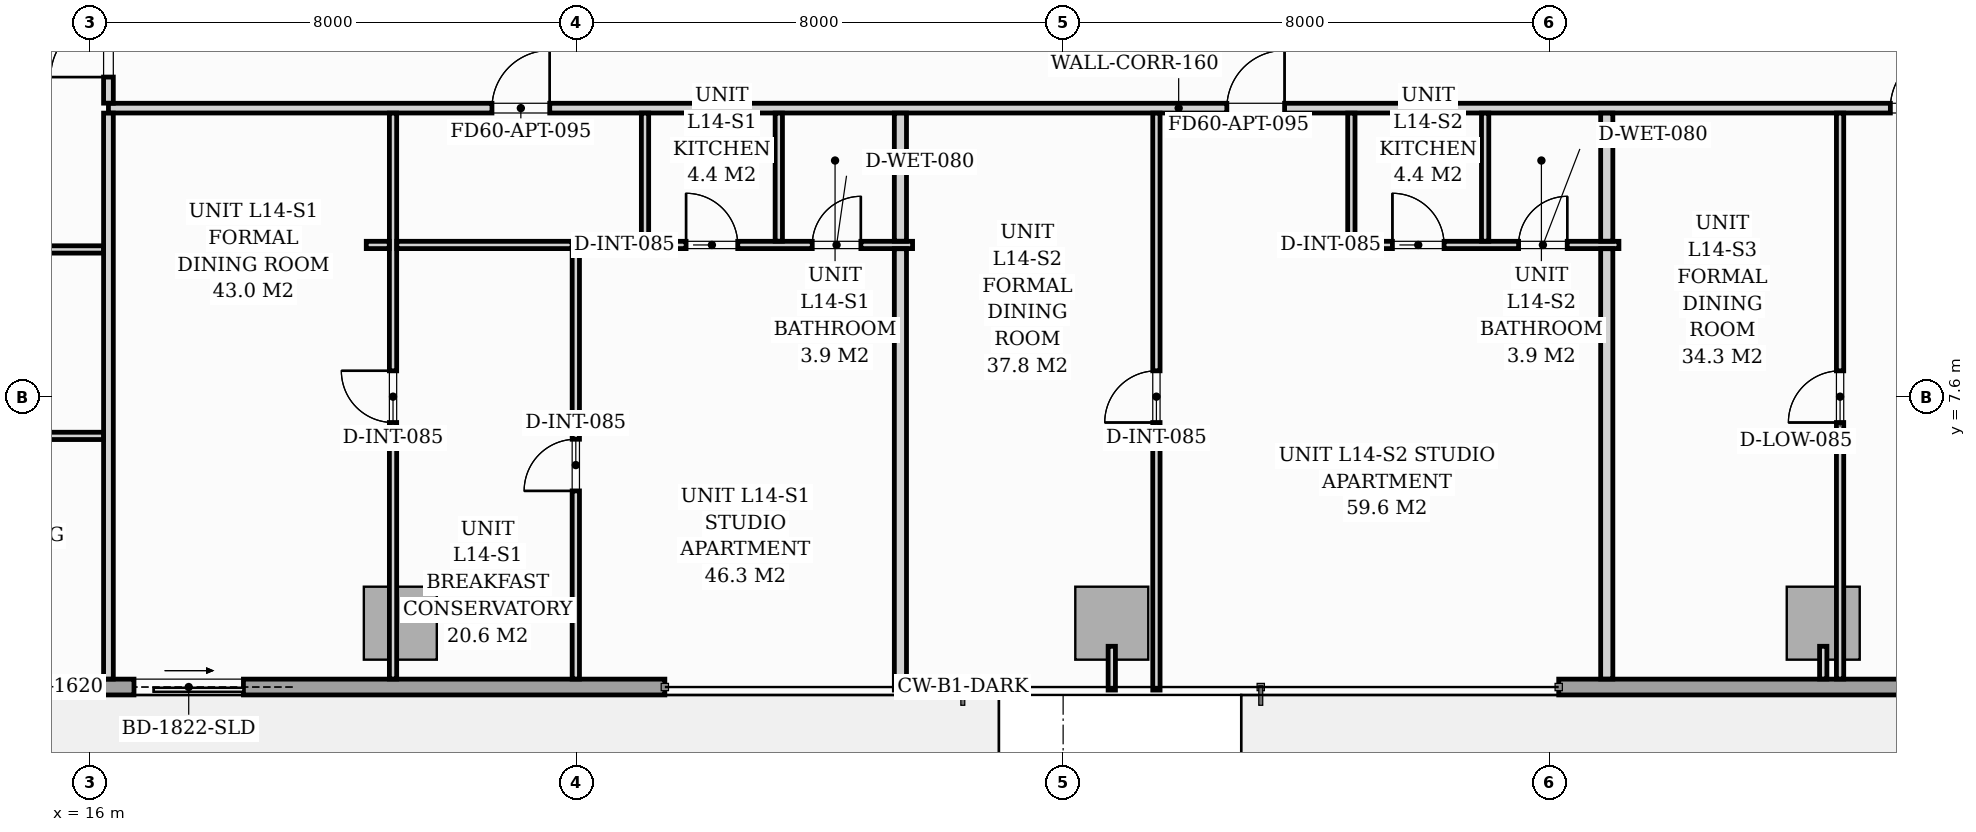
"""IFC4 building model, lengths in metres.
Left out: names, types, materials, properties, quantities, classifications, styles, units other than length and angle.
Written with IfcOpenShell. Run it as: python <this file> out.ifc"""

import sys

from ifc_helpers import new_model, si_unit, direction, frame, frame_2d, origin, origin_2d, place, context, subcontext, project, spatial, rectangle, extrude, source, transform, mapped, element, fill, save


model = new_model("IFC4")
c1 = context("Model", 3, precision=1e-05, world=origin(), true_north=direction((0.0, 1.0)))
c2 = subcontext(c1, "Body", "Model", "MODEL_VIEW")
j1 = project(units=[si_unit("LENGTHUNIT", "METRE"), si_unit("PLANEANGLEUNIT", "RADIAN")], contexts=[c1])
p1 = place(None, origin())
s1 = spatial("IfcSite", under=j1, at=p1, CompositionType="ELEMENT")
p2 = place(p1, origin())
s2 = spatial("IfcBuilding", under=s1, at=p2, CompositionType="ELEMENT")
p3 = place(p2, frame((0.0, 0.0, 51.8)))
s3 = spatial("IfcBuildingStorey", under=s2, at=p3, CompositionType="ELEMENT", Elevation=51.8)
m1 = source(origin(), c2, "Body", "SweptSolid", [
    extrude(rectangle(XDim=1.2, YDim=1.2, at=origin_2d()), origin(), (0.0, 0.0, 1.0), 3.196),
])
for number, where, z_axis, x_axis in (
    (1, (21.1, 3.88, 0.002), (0.0, 0.0, 1.0), (1.0, 0.0, 0.0)),
    (2, (32.8, 3.88, 0.002), (0.0, 0.0, 1.0), (1.0, 0.0, 0.0)),
    (3, (44.5, 3.88, 0.002), (0.0, 0.0, 1.0), (1.0, 0.0, 0.0)),
):
    element("IfcColumn", number, at=place(p3, frame(where, z_axis=z_axis, x_axis=x_axis)), inside=s3, PredefinedType="COLUMN", context=c2, shape_type="MappedRepresentation", body=[
        mapped(m1, transform((0.0, 0.0, 0.0), scale=1.0)),
    ])
p4 = place(p3, frame((57.3, 2.83, 0.0), z_axis=(0.0, 0.0, 1.0), x_axis=(-1.0, 0.0, 0.0)))
e4 = element("IfcWall", 4, at=p4, inside=s3, PredefinedType="STANDARD", context=c2, shape_type="SweptSolid", body=[
    extrude(rectangle(XDim=17.15, YDim=0.26, at=frame_2d((8.575, 0.0))), origin(), (0.0, 0.0, 1.0), 2.94),
])
p5 = place(p4, frame((8.034, 0.0, 0.0)))
e5 = element("IfcOpeningElement", 5, at=p5, cuts=e4, PredefinedType="OPENING", context=c2, shape_type="SweptSolid", body=[
    extrude(rectangle(XDim=1.8, YDim=2.06, at=frame_2d((0.9, 1.03))), frame((0.0, 0.14, 0.0), z_axis=(0.0, -1.0, 0.0), x_axis=(1.0, 0.0, 0.0)), (0.0, 0.0, 1.0), 0.28),
])
p6 = place(p4, frame((2.05, 0.0, 0.65)))
e6 = element("IfcOpeningElement", 6, at=p6, cuts=e4, PredefinedType="OPENING", context=c2, shape_type="SweptSolid", body=[
    extrude(rectangle(XDim=1.6, YDim=1.5, at=frame_2d((0.8, 0.75))), frame((0.0, 0.14, 0.0), z_axis=(0.0, -1.0, 0.0), x_axis=(1.0, 0.0, 0.0)), (0.0, 0.0, 1.0), 0.28),
])
p7 = place(p3, frame((25.45, 2.83, 0.0), z_axis=(0.0, 0.0, 1.0), x_axis=(-1.0, 0.0, 0.0)))
e7 = element("IfcWall", 7, at=p7, inside=s3, PredefinedType="STANDARD", context=c2, shape_type="SweptSolid", body=[
    extrude(rectangle(XDim=17.15, YDim=0.26, at=frame_2d((8.575, 0.0))), origin(), (0.0, 0.0, 1.0), 2.94),
])
p8 = place(p7, frame((6.93, 0.0, 0.0)))
e8 = element("IfcOpeningElement", 8, at=p8, cuts=e7, PredefinedType="OPENING", context=c2, shape_type="SweptSolid", body=[
    extrude(rectangle(XDim=1.8, YDim=2.06, at=frame_2d((0.9, 1.03))), frame((0.0, 0.14, 0.0), z_axis=(0.0, -1.0, 0.0), x_axis=(1.0, 0.0, 0.0)), (0.0, 0.0, 1.0), 0.28),
])
p9 = place(p7, frame((9.7, 0.0, 0.65)))
e9 = element("IfcOpeningElement", 9, at=p9, cuts=e7, PredefinedType="OPENING", context=c2, shape_type="SweptSolid", body=[
    extrude(rectangle(XDim=1.6, YDim=1.5, at=frame_2d((0.8, 0.75))), frame((0.0, 0.14, 0.0), z_axis=(0.0, -1.0, 0.0), x_axis=(1.0, 0.0, 0.0)), (0.0, 0.0, 1.0), 0.28),
])
p10 = place(p3, frame((16.3, 12.35, 0.0), z_axis=(0.0, 0.0, 1.0), x_axis=(1.0, 0.0, 0.0)))
e10 = element("IfcWall", 10, at=p10, inside=s3, PredefinedType="PARTITIONING", context=c2, shape_type="SweptSolid", body=[
    extrude(rectangle(XDim=35.2, YDim=0.16, at=frame_2d((17.6, 0.0))), origin(), (0.0, 0.0, 1.0), 2.94),
])
p11 = place(p10, frame((6.307, 0.0, 0.0)))
e11 = element("IfcOpeningElement", 11, at=p11, cuts=e10, PredefinedType="OPENING", context=c2, shape_type="SweptSolid", body=[
    extrude(rectangle(XDim=0.95, YDim=2.06, at=frame_2d((0.475, 1.03))), frame((0.0, 0.09, 0.0), z_axis=(0.0, -1.0, 0.0), x_axis=(1.0, 0.0, 0.0)), (0.0, 0.0, 1.0), 0.18),
])
p12 = place(p10, frame((18.392, 0.0, 0.0)))
e12 = element("IfcOpeningElement", 12, at=p12, cuts=e10, PredefinedType="OPENING", context=c2, shape_type="SweptSolid", body=[
    extrude(rectangle(XDim=0.95, YDim=2.06, at=frame_2d((0.475, 1.03))), frame((0.0, 0.09, 0.0), z_axis=(0.0, -1.0, 0.0), x_axis=(1.0, 0.0, 0.0)), (0.0, 0.0, 1.0), 0.18),
])
p13 = place(p10, frame((29.304, 0.0, 0.0)))
e13 = element("IfcOpeningElement", 13, at=p13, cuts=e10, PredefinedType="OPENING", context=c2, shape_type="SweptSolid", body=[
    extrude(rectangle(XDim=0.95, YDim=2.06, at=frame_2d((0.475, 1.03))), frame((0.0, 0.09, 0.0), z_axis=(0.0, -1.0, 0.0), x_axis=(1.0, 0.0, 0.0)), (0.0, 0.0, 1.0), 0.18),
])
p14 = place(p3, frame((16.3, 2.962, 0.0), z_axis=(0.0, 0.0, 1.0), x_axis=(0.0, 1.0, 0.0)))
e14 = element("IfcWall", 14, at=p14, inside=s3, PredefinedType="PARTITIONING", context=c2, shape_type="SweptSolid", body=[
    extrude(rectangle(XDim=9.306, YDim=0.16, at=frame_2d((4.653, 0.0))), origin(), (0.0, 0.0, 1.0), 2.94),
])
p15 = place(p3, frame((16.3, 12.432, 0.0), z_axis=(0.0, 0.0, 1.0), x_axis=(0.0, 1.0, 0.0)))
e15 = element("IfcWall", 15, at=p15, inside=s3, PredefinedType="PARTITIONING", context=c2, shape_type="SweptSolid", body=[
    extrude(rectangle(XDim=15.006, YDim=0.16, at=frame_2d((7.503, 0.0))), origin(), (0.0, 0.0, 1.0), 2.94),
])
p16 = place(p15, frame((0.429, 0.0, 0.0)))
e16 = element("IfcOpeningElement", 16, at=p16, cuts=e15, PredefinedType="OPENING", context=c2, shape_type="SweptSolid", body=[
    extrude(rectangle(XDim=0.95, YDim=2.06, at=frame_2d((0.475, 1.03))), frame((0.0, 0.09, 0.0), z_axis=(0.0, -1.0, 0.0), x_axis=(1.0, 0.0, 0.0)), (0.0, 0.0, 1.0), 0.18),
])
p17 = place(p3, frame((25.124, 10.1, 0.0), z_axis=(0.0, 0.0, 1.0), x_axis=(1.0, 0.0, 0.0)))
e17 = element("IfcWall", 17, at=p17, inside=s3, PredefinedType="PARTITIONING", context=c2, shape_type="SweptSolid", body=[
    extrude(rectangle(XDim=4.4, YDim=0.12, at=frame_2d((2.2, 0.0))), origin(), (0.0, 0.0, 1.0), 2.94),
])
p18 = place(p17, frame((0.675, 0.0, 0.0)))
e18 = element("IfcOpeningElement", 18, at=p18, cuts=e17, PredefinedType="OPENING", context=c2, shape_type="SweptSolid", body=[
    extrude(rectangle(XDim=0.85, YDim=2.05, at=frame_2d((0.425, 1.025))), frame((0.0, 0.07, 0.0), z_axis=(0.0, -1.0, 0.0), x_axis=(1.0, 0.0, 0.0)), (0.0, 0.0, 1.0), 0.14),
])
p19 = place(p17, frame((2.75, 0.0, 0.0)))
e19 = element("IfcOpeningElement", 19, at=p19, cuts=e17, PredefinedType="OPENING", context=c2, shape_type="SweptSolid", body=[
    extrude(rectangle(XDim=0.8, YDim=2.02, at=frame_2d((0.4, 1.01))), frame((0.0, 0.07, 0.0), z_axis=(0.0, -1.0, 0.0), x_axis=(1.0, 0.0, 0.0)), (0.0, 0.0, 1.0), 0.14),
])
for number, where, z_axis, x_axis in (
    (20, (25.124, 10.162, 0.0), (0.0, 0.0, 1.0), (0.0, 1.0, 0.0)),
    (21, (27.324, 10.162, 0.0), (0.0, 0.0, 1.0), (0.0, 1.0, 0.0)),
):
    element("IfcWall", number, at=place(p3, frame(where, z_axis=z_axis, x_axis=x_axis)), inside=s3, PredefinedType="PARTITIONING", context=c2, shape_type="SweptSolid", body=[
        extrude(rectangle(XDim=2.106, YDim=0.12, at=frame_2d((1.053, 0.0))), origin(), (0.0, 0.0, 1.0), 2.94),
    ])
p20 = place(p3, frame((20.98, 2.962, 0.0), z_axis=(0.0, 0.0, 1.0), x_axis=(0.0, 1.0, 0.0)))
e22 = element("IfcWall", 22, at=p20, inside=s3, PredefinedType="PARTITIONING", context=c2, shape_type="SweptSolid", body=[
    extrude(rectangle(XDim=9.306, YDim=0.12, at=frame_2d((4.653, 0.0))), origin(), (0.0, 0.0, 1.0), 2.94),
])
p21 = place(p20, frame((4.218, 0.0, 0.0)))
e23 = element("IfcOpeningElement", 23, at=p21, cuts=e22, PredefinedType="OPENING", context=c2, shape_type="SweptSolid", body=[
    extrude(rectangle(XDim=0.85, YDim=2.05, at=frame_2d((0.425, 1.025))), frame((0.0, 0.07, 0.0), z_axis=(0.0, -1.0, 0.0), x_axis=(1.0, 0.0, 0.0)), (0.0, 0.0, 1.0), 0.14),
])
p22 = place(p3, frame((23.986, 2.962, 0.0), z_axis=(0.0, 0.0, 1.0), x_axis=(0.0, 1.0, 0.0)))
e24 = element("IfcWall", 24, at=p22, inside=s3, PredefinedType="PARTITIONING", context=c2, shape_type="SweptSolid", body=[
    extrude(rectangle(XDim=7.138, YDim=0.12, at=frame_2d((3.569, 0.0))), origin(), (0.0, 0.0, 1.0), 2.94),
])
p23 = place(p22, frame((3.093, 0.0, 0.0)))
e25 = element("IfcOpeningElement", 25, at=p23, cuts=e24, PredefinedType="OPENING", context=c2, shape_type="SweptSolid", body=[
    extrude(rectangle(XDim=0.85, YDim=2.05, at=frame_2d((0.425, 1.025))), frame((0.0, 0.07, 0.0), z_axis=(0.0, -1.0, 0.0), x_axis=(1.0, 0.0, 0.0)), (0.0, 0.0, 1.0), 0.14),
])
p24 = place(p3, frame((20.54, 10.1, 0.0), z_axis=(0.0, 0.0, 1.0), x_axis=(1.0, 0.0, 0.0)))
e26 = element("IfcWall", 26, at=p24, inside=s3, PredefinedType="PARTITIONING", context=c2, shape_type="SweptSolid", body=[
    extrude(rectangle(XDim=0.378, YDim=0.12, at=frame_2d((0.189, 0.0))), origin(), (0.0, 0.0, 1.0), 2.94),
])
p25 = place(p3, frame((21.042, 10.1, 0.0), z_axis=(0.0, 0.0, 1.0), x_axis=(1.0, 0.0, 0.0)))
e27 = element("IfcWall", 27, at=p25, inside=s3, PredefinedType="PARTITIONING", context=c2, shape_type="SweptSolid", body=[
    extrude(rectangle(XDim=2.882, YDim=0.12, at=frame_2d((1.441, 0.0))), origin(), (0.0, 0.0, 1.0), 2.94),
])
p26 = place(p3, frame((29.324, 2.78, 0.0), z_axis=(0.0, 0.0, 1.0), x_axis=(0.0, 1.0, 0.0)))
e28 = element("IfcWall", 28, at=p26, inside=s3, PredefinedType="PARTITIONING", context=c2, shape_type="SweptSolid", body=[
    extrude(rectangle(XDim=7.258, YDim=0.2, at=frame_2d((3.629, 0.0))), origin(), (0.0, 0.0, 1.0), 2.94),
])
p27 = place(p3, frame((29.324, 10.162, 0.0), z_axis=(0.0, 0.0, 1.0), x_axis=(0.0, 1.0, 0.0)))
e29 = element("IfcWall", 29, at=p27, inside=s3, PredefinedType="PARTITIONING", context=c2, shape_type="SweptSolid", body=[
    extrude(rectangle(XDim=2.106, YDim=0.2, at=frame_2d((1.053, 0.0))), origin(), (0.0, 0.0, 1.0), 2.94),
])
p28 = place(p3, frame((36.74, 10.1, 0.0), z_axis=(0.0, 0.0, 1.0), x_axis=(1.0, 0.0, 0.0)))
e30 = element("IfcWall", 30, at=p28, inside=s3, PredefinedType="PARTITIONING", context=c2, shape_type="SweptSolid", body=[
    extrude(rectangle(XDim=4.4, YDim=0.12, at=frame_2d((2.2, 0.0))), origin(), (0.0, 0.0, 1.0), 2.94),
])
p29 = place(p28, frame((0.675, 0.0, 0.0)))
e31 = element("IfcOpeningElement", 31, at=p29, cuts=e30, PredefinedType="OPENING", context=c2, shape_type="SweptSolid", body=[
    extrude(rectangle(XDim=0.85, YDim=2.05, at=frame_2d((0.425, 1.025))), frame((0.0, 0.07, 0.0), z_axis=(0.0, -1.0, 0.0), x_axis=(1.0, 0.0, 0.0)), (0.0, 0.0, 1.0), 0.14),
])
p30 = place(p28, frame((2.75, 0.0, 0.0)))
e32 = element("IfcOpeningElement", 32, at=p30, cuts=e30, PredefinedType="OPENING", context=c2, shape_type="SweptSolid", body=[
    extrude(rectangle(XDim=0.8, YDim=2.02, at=frame_2d((0.4, 1.01))), frame((0.0, 0.07, 0.0), z_axis=(0.0, -1.0, 0.0), x_axis=(1.0, 0.0, 0.0)), (0.0, 0.0, 1.0), 0.14),
])
for number, where, z_axis, x_axis in (
    (33, (36.74, 10.162, 0.0), (0.0, 0.0, 1.0), (0.0, 1.0, 0.0)),
    (34, (38.94, 10.162, 0.0), (0.0, 0.0, 1.0), (0.0, 1.0, 0.0)),
):
    element("IfcWall", number, at=place(p3, frame(where, z_axis=z_axis, x_axis=x_axis)), inside=s3, PredefinedType="PARTITIONING", context=c2, shape_type="SweptSolid", body=[
        extrude(rectangle(XDim=2.106, YDim=0.12, at=frame_2d((1.053, 0.0))), origin(), (0.0, 0.0, 1.0), 2.94),
    ])
p31 = place(p3, frame((33.534, 2.78, 0.0), z_axis=(0.0, 0.0, 1.0), x_axis=(0.0, 1.0, 0.0)))
e35 = element("IfcWall", 35, at=p31, inside=s3, PredefinedType="PARTITIONING", context=c2, shape_type="SweptSolid", body=[
    extrude(rectangle(XDim=9.488, YDim=0.12, at=frame_2d((4.744, 0.0))), origin(), (0.0, 0.0, 1.0), 2.94),
])
p32 = place(p31, frame((4.4, 0.0, 0.0)))
e36 = element("IfcOpeningElement", 36, at=p32, cuts=e35, PredefinedType="OPENING", context=c2, shape_type="SweptSolid", body=[
    extrude(rectangle(XDim=0.85, YDim=2.05, at=frame_2d((0.425, 1.025))), frame((0.0, 0.07, 0.0), z_axis=(0.0, -1.0, 0.0), x_axis=(1.0, 0.0, 0.0)), (0.0, 0.0, 1.0), 0.14),
])
p33 = place(p3, frame((40.94, 2.962, 0.0), z_axis=(0.0, 0.0, 1.0), x_axis=(0.0, 1.0, 0.0)))
e37 = element("IfcWall", 37, at=p33, inside=s3, PredefinedType="PARTITIONING", context=c2, shape_type="SweptSolid", body=[
    extrude(rectangle(XDim=7.076, YDim=0.2, at=frame_2d((3.538, 0.0))), origin(), (0.0, 0.0, 1.0), 2.94),
])
p34 = place(p3, frame((40.94, 10.162, 0.0), z_axis=(0.0, 0.0, 1.0), x_axis=(0.0, 1.0, 0.0)))
e38 = element("IfcWall", 38, at=p34, inside=s3, PredefinedType="PARTITIONING", context=c2, shape_type="SweptSolid", body=[
    extrude(rectangle(XDim=2.106, YDim=0.2, at=frame_2d((1.053, 0.0))), origin(), (0.0, 0.0, 1.0), 2.94),
])
p35 = place(p3, frame((44.777, 2.962, 0.0), z_axis=(0.0, 0.0, 1.0), x_axis=(0.0, 1.0, 0.0)))
e39 = element("IfcWall", 39, at=p35, inside=s3, PredefinedType="PARTITIONING", context=c2, shape_type="SweptSolid", body=[
    extrude(rectangle(XDim=9.306, YDim=0.12, at=frame_2d((4.653, 0.0))), origin(), (0.0, 0.0, 1.0), 2.136),
])
p36 = place(p35, frame((4.218, 0.0, 0.0)))
e40 = element("IfcOpeningElement", 40, at=p36, cuts=e39, PredefinedType="OPENING", context=c2, shape_type="SweptSolid", body=[
    extrude(rectangle(XDim=0.85, YDim=2.01, at=frame_2d((0.425, 1.005))), frame((0.0, 0.07, 0.0), z_axis=(0.0, -1.0, 0.0), x_axis=(1.0, 0.0, 0.0)), (0.0, 0.0, 1.0), 0.14),
])
p37 = place(p3, frame((5.88, 6.96, 0.0), z_axis=(0.0, 0.0, 1.0), x_axis=(1.0, 0.0, 0.0)))
e41 = element("IfcWall", 41, at=p37, inside=s3, PredefinedType="PARTITIONING", context=c2, shape_type="SweptSolid", body=[
    extrude(rectangle(XDim=10.338, YDim=0.12, at=frame_2d((5.169, 0.0))), origin(), (0.0, 0.0, 1.0), 2.94),
])
p38 = place(p37, frame((4.735, 0.0, 0.0)))
e42 = element("IfcOpeningElement", 42, at=p38, cuts=e41, PredefinedType="OPENING", context=c2, shape_type="SweptSolid", body=[
    extrude(rectangle(XDim=0.85, YDim=2.05, at=frame_2d((0.425, 1.025))), frame((0.0, 0.07, 0.0), z_axis=(0.0, -1.0, 0.0), x_axis=(1.0, 0.0, 0.0)), (0.0, 0.0, 1.0), 0.14),
])
p39 = place(p3, frame((5.88, 10.026, 0.0), z_axis=(0.0, 0.0, 1.0), x_axis=(1.0, 0.0, 0.0)))
e43 = element("IfcWall", 43, at=p39, inside=s3, PredefinedType="PARTITIONING", context=c2, shape_type="SweptSolid", body=[
    extrude(rectangle(XDim=10.338, YDim=0.12, at=frame_2d((5.169, 0.0))), origin(), (0.0, 0.0, 1.0), 2.94),
])
p40 = place(p39, frame((4.735, 0.0, 0.0)))
e44 = element("IfcOpeningElement", 44, at=p40, cuts=e43, PredefinedType="OPENING", context=c2, shape_type="SweptSolid", body=[
    extrude(rectangle(XDim=0.85, YDim=2.05, at=frame_2d((0.425, 1.025))), frame((0.0, 0.07, 0.0), z_axis=(0.0, -1.0, 0.0), x_axis=(1.0, 0.0, 0.0)), (0.0, 0.0, 1.0), 0.14),
])
p41 = place(p3, frame((32.8, 3.5, 0.0), z_axis=(0.0, 0.0, 1.0), x_axis=(0.0, -1.0, 0.0)))
e45 = element("IfcWall", 45, at=p41, inside=s3, PredefinedType="PARTITIONING", context=c2, shape_type="SweptSolid", body=[
    extrude(rectangle(XDim=0.72, YDim=0.12, at=frame_2d((0.36, 0.0))), origin(), (0.0, 0.0, 1.0), 2.94),
])
p42 = place(p3, frame((44.5, 3.5, 0.0), z_axis=(0.0, 0.0, 1.0), x_axis=(0.0, -1.0, 0.0)))
e46 = element("IfcWall", 46, at=p42, inside=s3, PredefinedType="PARTITIONING", context=c2, shape_type="SweptSolid", body=[
    extrude(rectangle(XDim=0.538, YDim=0.12, at=frame_2d((0.269, 0.0))), origin(), (0.0, 0.0, 1.0), 2.94),
])
m2 = source(origin(), c2, "Body", "SweptSolid", [
    extrude(rectangle(XDim=1.8, YDim=2.06, at=frame_2d((0.9, 1.03))), frame((0.0, 0.025, 0.0), z_axis=(0.0, -1.0, 0.0), x_axis=(1.0, 0.0, 0.0)), (0.0, 0.0, 1.0), 0.05),
])
p43 = place(p8, origin())
e47 = element("IfcDoor", 47, at=p43, inside=s3, OperationType="SLIDING_TO_LEFT", PredefinedType="DOOR", context=c2, shape_type="MappedRepresentation", body=[
    mapped(m2, transform((0.0, 0.0, 0.0), scale=1.0)),
])
fill(e8, e47)
m3 = source(origin(), c2, "Body", "SweptSolid", [
    extrude(rectangle(XDim=1.6, YDim=1.5, at=frame_2d((0.8, 0.75))), frame((0.0, 0.03, 0.0), z_axis=(0.0, -1.0, 0.0), x_axis=(1.0, 0.0, 0.0)), (0.0, 0.0, 1.0), 0.06),
])
p44 = place(p9, origin())
e48 = element("IfcWindow", 48, at=p44, inside=s3, PartitioningType="SINGLE_PANEL", PredefinedType="WINDOW", context=c2, shape_type="MappedRepresentation", body=[
    mapped(m3, transform((0.0, 0.0, 0.0), scale=1.0)),
])
fill(e9, e48)
m4 = source(origin(), c2, "Body", "SweptSolid", [
    extrude(rectangle(XDim=0.85, YDim=2.05, at=frame_2d((0.425, 1.025))), frame((0.0, 0.025, 0.0), z_axis=(0.0, -1.0, 0.0), x_axis=(1.0, 0.0, 0.0)), (0.0, 0.0, 1.0), 0.05),
])
p45 = place(p21, origin())
e49 = element("IfcDoor", 49, at=p45, inside=s3, OperationType="SINGLE_SWING_RIGHT", PredefinedType="DOOR", context=c2, shape_type="MappedRepresentation", body=[
    mapped(m4, transform((0.0, 0.0, 0.0), scale=1.0)),
])
fill(e23, e49)
p46 = place(p23, origin())
e50 = element("IfcDoor", 50, at=p46, inside=s3, OperationType="SINGLE_SWING_LEFT", PredefinedType="DOOR", context=c2, shape_type="MappedRepresentation", body=[
    mapped(m4, transform((0.0, 0.0, 0.0), scale=1.0)),
])
fill(e25, e50)
m5 = source(origin(), c2, "Body", "SweptSolid", [
    extrude(rectangle(XDim=0.95, YDim=2.06, at=frame_2d((0.475, 1.03))), frame((0.0, 0.025, 0.0), z_axis=(0.0, -1.0, 0.0), x_axis=(1.0, 0.0, 0.0)), (0.0, 0.0, 1.0), 0.05),
])
p47 = place(p11, origin())
e51 = element("IfcDoor", 51, at=p47, inside=s3, OperationType="SINGLE_SWING_RIGHT", PredefinedType="DOOR", context=c2, shape_type="MappedRepresentation", body=[
    mapped(m5, transform((0.0, 0.0, 0.0), scale=1.0)),
])
fill(e11, e51)
p48 = place(p18, origin())
e52 = element("IfcDoor", 52, at=p48, inside=s3, OperationType="SINGLE_SWING_LEFT", PredefinedType="DOOR", context=c2, shape_type="MappedRepresentation", body=[
    mapped(m4, transform((0.0, 0.0, 0.0), scale=1.0)),
])
fill(e18, e52)
m6 = source(origin(), c2, "Body", "SweptSolid", [
    extrude(rectangle(XDim=0.8, YDim=2.02, at=frame_2d((0.4, 1.01))), frame((0.0, 0.025, 0.0), z_axis=(0.0, -1.0, 0.0), x_axis=(1.0, 0.0, 0.0)), (0.0, 0.0, 1.0), 0.05),
])
p49 = place(p19, origin())
e53 = element("IfcDoor", 53, at=p49, inside=s3, OperationType="SINGLE_SWING_RIGHT", PredefinedType="DOOR", context=c2, shape_type="MappedRepresentation", body=[
    mapped(m6, transform((0.0, 0.0, 0.0), scale=1.0)),
])
fill(e19, e53)
p50 = place(p32, origin())
e54 = element("IfcDoor", 54, at=p50, inside=s3, OperationType="SINGLE_SWING_LEFT", PredefinedType="DOOR", context=c2, shape_type="MappedRepresentation", body=[
    mapped(m4, transform((0.0, 0.0, 0.0), scale=1.0)),
])
fill(e36, e54)
p51 = place(p12, origin())
e55 = element("IfcDoor", 55, at=p51, inside=s3, OperationType="SINGLE_SWING_RIGHT", PredefinedType="DOOR", context=c2, shape_type="MappedRepresentation", body=[
    mapped(m5, transform((0.0, 0.0, 0.0), scale=1.0)),
])
fill(e12, e55)
p52 = place(p29, origin())
e56 = element("IfcDoor", 56, at=p52, inside=s3, OperationType="SINGLE_SWING_LEFT", PredefinedType="DOOR", context=c2, shape_type="MappedRepresentation", body=[
    mapped(m4, transform((0.0, 0.0, 0.0), scale=1.0)),
])
fill(e31, e56)
p53 = place(p30, origin())
e57 = element("IfcDoor", 57, at=p53, inside=s3, OperationType="SINGLE_SWING_RIGHT", PredefinedType="DOOR", context=c2, shape_type="MappedRepresentation", body=[
    mapped(m6, transform((0.0, 0.0, 0.0), scale=1.0)),
])
fill(e32, e57)
m7 = source(origin(), c2, "Body", "SweptSolid", [
    extrude(rectangle(XDim=0.85, YDim=2.01, at=frame_2d((0.425, 1.005))), frame((0.0, 0.025, 0.0), z_axis=(0.0, -1.0, 0.0), x_axis=(1.0, 0.0, 0.0)), (0.0, 0.0, 1.0), 0.05),
])
p54 = place(p36, origin())
e58 = element("IfcDoor", 58, at=p54, inside=s3, OperationType="SINGLE_SWING_LEFT", PredefinedType="DOOR", context=c2, shape_type="MappedRepresentation", body=[
    mapped(m7, transform((0.0, 0.0, 0.0), scale=1.0)),
])
fill(e40, e58)
p55 = place(p13, origin())
e59 = element("IfcDoor", 59, at=p55, inside=s3, OperationType="SINGLE_SWING_RIGHT", PredefinedType="DOOR", context=c2, shape_type="MappedRepresentation", body=[
    mapped(m5, transform((0.0, 0.0, 0.0), scale=1.0)),
])
fill(e13, e59)
p56 = place(p16, origin())
e60 = element("IfcDoor", 60, at=p56, inside=s3, OperationType="SINGLE_SWING_LEFT", PredefinedType="DOOR", context=c2, shape_type="MappedRepresentation", body=[
    mapped(m5, transform((0.0, 0.0, 0.0), scale=1.0)),
])
fill(e16, e60)
save(model, sys.argv[1])
